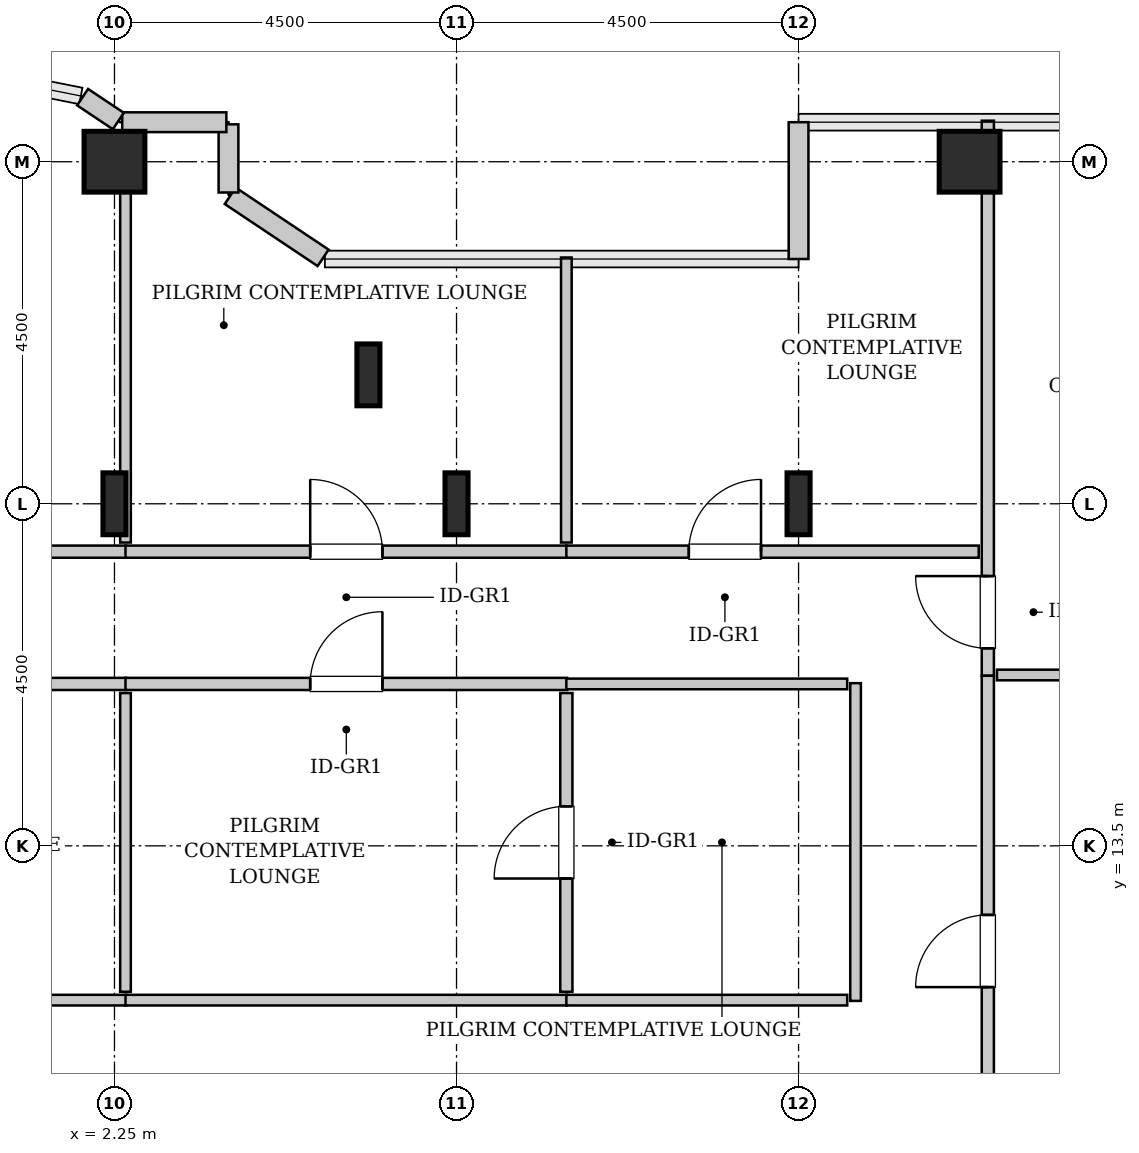
"""IFC4 building model, lengths in metres.
Left out: names, types, materials, properties, quantities, classifications, styles, units other than length and angle.
Written with IfcOpenShell. Run it as: python <this file> out.ifc"""

import sys

from ifc_helpers import new_model, si_unit, direction, frame, frame_2d, origin, origin_2d, place, context, subcontext, project, spatial, rectangle, hollow_rectangle, i_section, extrude, source, transform, mapped, element, fill, save


model = new_model("IFC4")
c1 = context("Model", 3, precision=1e-05, world=origin(), true_north=direction((0.0, 1.0)))
c2 = subcontext(c1, "Body", "Model", "MODEL_VIEW")
j1 = project(units=[si_unit("LENGTHUNIT", "METRE"), si_unit("PLANEANGLEUNIT", "RADIAN")], contexts=[c1])
p1 = place(None, origin())
s1 = spatial("IfcSite", under=j1, at=p1, CompositionType="ELEMENT")
p2 = place(p1, origin())
s2 = spatial("IfcBuilding", under=s1, at=p2, CompositionType="ELEMENT")
p3 = place(p2, frame((0.0, 0.0, 152.6)))
s3 = spatial("IfcBuildingStorey", under=s2, at=p3, CompositionType="ELEMENT", Elevation=152.6)
m1 = source(origin(), c2, "Body", "SweptSolid", [
    extrude(i_section(OverallWidth=0.303, OverallDepth=0.814, WebThickness=0.021, FlangeThickness=0.04, FilletRadius=0.03, at=origin_2d()), origin(), (0.0, 0.0, 1.0), 3.8),
])
p4 = place(p3, frame((2.25, 18.0, 0.0), z_axis=(0.0, 0.0, 1.0), x_axis=(1.0, 0.0, 0.0)))
e1 = element("IfcColumn", 1, at=p4, inside=s3, PredefinedType="COLUMN", context=c2, shape_type="MappedRepresentation", body=[
    mapped(m1, transform((0.0, 0.0, 0.0), x_axis=(1.0, 0.0, 0.0), y_axis=(0.0, 1.0, 0.0), z_axis=(0.0, 0.0, 1.0), scale=1.0)),
])
m2 = source(origin(), c2, "Body", "SweptSolid", [
    extrude(hollow_rectangle(XDim=0.8, YDim=0.8, WallThickness=0.04, InnerFilletRadius=0.04, OuterFilletRadius=0.08, at=origin_2d()), origin(), (0.0, 0.0, 1.0), 3.8),
])
p5 = place(p3, frame((2.25, 22.5, 0.0), z_axis=(0.0, 0.0, 1.0), x_axis=(1.0, 0.0, 0.0)))
e2 = element("IfcColumn", 2, at=p5, inside=s3, PredefinedType="COLUMN", context=c2, shape_type="MappedRepresentation", body=[
    mapped(m2, transform((0.0, 0.0, 0.0), x_axis=(1.0, 0.0, 0.0), y_axis=(0.0, 1.0, 0.0), z_axis=(0.0, 0.0, 1.0), scale=1.0)),
])
for number, where, z_axis, x_axis in (
    (3, (5.591, 19.696, 0.0), (0.0, 0.0, 1.0), (1.0, 0.0, 0.0)),
    (4, (6.75, 18.0, 0.0), (0.0, 0.0, 1.0), (1.0, 0.0, 0.0)),
    (5, (11.25, 18.0, 0.0), (0.0, 0.0, 1.0), (1.0, 0.0, 0.0)),
):
    element("IfcColumn", number, at=place(p3, frame(where, z_axis=z_axis, x_axis=x_axis)), inside=s3, PredefinedType="COLUMN", context=c2, shape_type="MappedRepresentation", body=[
        mapped(m1, transform((0.0, 0.0, 0.0), x_axis=(1.0, 0.0, 0.0), y_axis=(0.0, 1.0, 0.0), z_axis=(0.0, 0.0, 1.0), scale=1.0)),
    ])
p6 = place(p3, frame((13.5, 22.5, 0.0), z_axis=(0.0, 0.0, 1.0), x_axis=(1.0, 0.0, 0.0)))
e6 = element("IfcColumn", 6, at=p6, inside=s3, PredefinedType="COLUMN", context=c2, shape_type="MappedRepresentation", body=[
    mapped(m2, transform((0.0, 0.0, 0.0), x_axis=(1.0, 0.0, 0.0), y_axis=(0.0, 1.0, 0.0), z_axis=(0.0, 0.0, 1.0), scale=1.0)),
])
m3 = source(origin(), c2, "Body", "SweptSolid", [
    extrude(rectangle(XDim=1.8, YDim=0.26, at=frame_2d((0.9, 0.0))), origin(), (0.0, 0.0, 1.0), 3.55),
])
p7 = place(p3, frame((11.25, 23.02, 0.0), z_axis=(0.0, 0.0, 1.0), x_axis=(0.0, -1.0, 0.0)))
e7 = element("IfcWall", 7, at=p7, inside=s3, PredefinedType="SOLIDWALL", context=c2, shape_type="MappedRepresentation", body=[
    mapped(m3, transform((0.0, 0.0, 0.0), x_axis=(1.0, 0.0, 0.0), y_axis=(0.0, 1.0, 0.0), z_axis=(0.0, 0.0, 1.0), scale=1.0)),
])
m4 = source(origin(), c2, "Body", "SweptSolid", [
    extrude(rectangle(XDim=1.469, YDim=0.26, at=frame_2d((0.734, 0.0))), origin(), (0.0, 0.0, 1.0), 3.55),
])
p8 = place(p3, frame((4.995, 21.236, 0.0), z_axis=(0.0, 0.0, 1.0), x_axis=(-0.831461760506, 0.555581983884, 0.0)))
e8 = element("IfcWall", 8, at=p8, inside=s3, PredefinedType="SOLIDWALL", context=c2, shape_type="MappedRepresentation", body=[
    mapped(m4, transform((0.0, 0.0, 0.0), x_axis=(1.0, 0.0, 0.0), y_axis=(0.0, 1.0, 0.0), z_axis=(0.0, 0.0, 1.0), scale=1.0)),
])
m5 = source(origin(), c2, "Body", "SweptSolid", [
    extrude(rectangle(XDim=0.897, YDim=0.26, at=frame_2d((0.448, 0.0))), origin(), (0.0, 0.0, 1.0), 3.55),
])
p9 = place(p3, frame((3.75, 22.095, 0.0), z_axis=(0.0, 0.0, 1.0), x_axis=(0.0, 1.0, 0.0)))
e9 = element("IfcWall", 9, at=p9, inside=s3, PredefinedType="SOLIDWALL", context=c2, shape_type="MappedRepresentation", body=[
    mapped(m5, transform((0.0, 0.0, 0.0), x_axis=(1.0, 0.0, 0.0), y_axis=(0.0, 1.0, 0.0), z_axis=(0.0, 0.0, 1.0), scale=1.0)),
])
m6 = source(origin(), c2, "Body", "SweptSolid", [
    extrude(rectangle(XDim=1.37, YDim=0.26, at=frame_2d((0.685, 0.0))), origin(), (0.0, 0.0, 1.0), 3.55),
])
p10 = place(p3, frame((3.722, 23.02, 0.0), z_axis=(0.0, 0.0, 1.0), x_axis=(-1.0, 0.0, 0.0)))
e10 = element("IfcWall", 10, at=p10, inside=s3, PredefinedType="SOLIDWALL", context=c2, shape_type="MappedRepresentation", body=[
    mapped(m6, transform((0.0, 0.0, 0.0), x_axis=(1.0, 0.0, 0.0), y_axis=(0.0, 1.0, 0.0), z_axis=(0.0, 0.0, 1.0), scale=1.0)),
])
m7 = source(origin(), c2, "Body", "SweptSolid", [
    extrude(rectangle(XDim=0.565, YDim=0.26, at=frame_2d((0.283, 0.0))), origin(), (0.0, 0.0, 1.0), 3.55),
])
p11 = place(p3, frame((2.301, 23.036, 0.0), z_axis=(0.0, 0.0, 1.0), x_axis=(-0.831651492666, 0.555297933317, 0.0)))
e11 = element("IfcWall", 11, at=p11, inside=s3, PredefinedType="SOLIDWALL", context=c2, shape_type="MappedRepresentation", body=[
    mapped(m7, transform((0.0, 0.0, 0.0), x_axis=(1.0, 0.0, 0.0), y_axis=(0.0, 1.0, 0.0), z_axis=(0.0, 0.0, 1.0), scale=1.0)),
])
m8 = source(origin(), c2, "Body", "SweptSolid", [
    extrude(rectangle(XDim=7.302, YDim=0.16, at=frame_2d((3.651, 0.0))), origin(), (0.0, 0.0, 1.0), 3.535),
])
p12 = place(p3, frame((13.74, 15.738, 0.0), z_axis=(0.0, 0.0, 1.0), x_axis=(0.0, 1.0, 0.0)))
e12 = element("IfcWall", 12, at=p12, inside=s3, PredefinedType="PARTITIONING", context=c2, shape_type="MappedRepresentation", body=[
    mapped(m8, transform((0.0, 0.0, 0.0), x_axis=(1.0, 0.0, 0.0), y_axis=(0.0, 1.0, 0.0), z_axis=(0.0, 0.0, 1.0), scale=1.0)),
])
p13 = place(p12, frame((0.361, 0.0, 0.0)))
e13 = element("IfcOpeningElement", 13, at=p13, cuts=e12, PredefinedType="OPENING", context=c2, shape_type="SweptSolid", body=[
    extrude(rectangle(XDim=0.95, YDim=2.1, at=frame_2d((0.475, 1.05))), frame((0.0, 0.09, 0.0), z_axis=(0.0, -1.0, 0.0), x_axis=(1.0, 0.0, 0.0)), (0.0, 0.0, 1.0), 0.18),
])
m9 = source(origin(), c2, "Body", "SweptSolid", [
    extrude(rectangle(XDim=11.43, YDim=0.14, at=frame_2d((5.715, 0.0))), origin(), (0.0, 0.0, 1.0), 3.535),
])
p14 = place(p3, frame((13.86, 15.748, 0.0), z_axis=(0.0, 0.0, 1.0), x_axis=(1.0, 0.0, 0.0)))
e14 = element("IfcWall", 14, at=p14, inside=s3, PredefinedType="PARTITIONING", context=c2, shape_type="MappedRepresentation", body=[
    mapped(m9, transform((0.0, 0.0, 0.0), x_axis=(1.0, 0.0, 0.0), y_axis=(0.0, 1.0, 0.0), z_axis=(0.0, 0.0, 1.0), scale=1.0)),
])
m10 = source(origin(), c2, "Body", "SweptSolid", [
    extrude(rectangle(XDim=7.242, YDim=0.16, at=frame_2d((3.621, 0.0))), origin(), (0.0, 0.0, 1.0), 3.535),
])
p15 = place(p3, frame((13.74, 8.495, 0.0), z_axis=(0.0, 0.0, 1.0), x_axis=(0.0, 1.0, 0.0)))
e15 = element("IfcWall", 15, at=p15, inside=s3, PredefinedType="PARTITIONING", context=c2, shape_type="MappedRepresentation", body=[
    mapped(m10, transform((0.0, 0.0, 0.0), x_axis=(1.0, 0.0, 0.0), y_axis=(0.0, 1.0, 0.0), z_axis=(0.0, 0.0, 1.0), scale=1.0)),
])
p16 = place(p15, frame((3.146, 0.0, 0.0)))
e16 = element("IfcOpeningElement", 16, at=p16, cuts=e15, PredefinedType="OPENING", context=c2, shape_type="SweptSolid", body=[
    extrude(rectangle(XDim=0.95, YDim=2.1, at=frame_2d((0.475, 1.05))), frame((0.0, 0.09, 0.0), z_axis=(0.0, -1.0, 0.0), x_axis=(1.0, 0.0, 0.0)), (0.0, 0.0, 1.0), 0.18),
])
m11 = source(origin(), c2, "Body", "SweptSolid", [
    extrude(rectangle(XDim=7.41, YDim=0.16, at=frame_2d((3.705, 0.0))), origin(), (0.0, 0.0, 1.0), 3.535),
])
p17 = place(p3, frame((-5.005, 17.37, 0.0), z_axis=(0.0, 0.0, 1.0), x_axis=(1.0, 0.0, 0.0)))
e17 = element("IfcWall", 17, at=p17, inside=s3, PredefinedType="PARTITIONING", context=c2, shape_type="MappedRepresentation", body=[
    mapped(m11, transform((0.0, 0.0, 0.0), x_axis=(1.0, 0.0, 0.0), y_axis=(0.0, 1.0, 0.0), z_axis=(0.0, 0.0, 1.0), scale=1.0)),
])
p18 = place(p17, frame((3.23, 0.0, 0.0)))
e18 = element("IfcOpeningElement", 18, at=p18, cuts=e17, PredefinedType="OPENING", context=c2, shape_type="SweptSolid", body=[
    extrude(rectangle(XDim=0.95, YDim=2.1, at=frame_2d((0.475, 1.05))), frame((0.0, 0.09, 0.0), z_axis=(0.0, -1.0, 0.0), x_axis=(1.0, 0.0, 0.0)), (0.0, 0.0, 1.0), 0.18),
])
m12 = source(origin(), c2, "Body", "SweptSolid", [
    extrude(rectangle(XDim=5.36, YDim=0.14, at=frame_2d((2.68, 0.0))), origin(), (0.0, 0.0, 1.0), 2.875),
])
p19 = place(p3, frame((2.395, 17.49, 0.0), z_axis=(0.0, 0.0, 1.0), x_axis=(0.0, 1.0, 0.0)))
e19 = element("IfcWall", 19, at=p19, inside=s3, PredefinedType="PARTITIONING", context=c2, shape_type="MappedRepresentation", body=[
    mapped(m12, transform((0.0, 0.0, 0.0), x_axis=(1.0, 0.0, 0.0), y_axis=(0.0, 1.0, 0.0), z_axis=(0.0, 0.0, 1.0), scale=1.0)),
])
p20 = place(p3, frame((-5.005, 15.63, 0.0), z_axis=(0.0, 0.0, 1.0), x_axis=(1.0, 0.0, 0.0)))
e20 = element("IfcWall", 20, at=p20, inside=s3, PredefinedType="PARTITIONING", context=c2, shape_type="MappedRepresentation", body=[
    mapped(m11, transform((0.0, 0.0, 0.0), x_axis=(1.0, 0.0, 0.0), y_axis=(0.0, 1.0, 0.0), z_axis=(0.0, 0.0, 1.0), scale=1.0)),
])
p21 = place(p20, frame((3.23, 0.0, 0.0)))
e21 = element("IfcOpeningElement", 21, at=p21, cuts=e20, PredefinedType="OPENING", context=c2, shape_type="SweptSolid", body=[
    extrude(rectangle(XDim=0.95, YDim=2.1, at=frame_2d((0.475, 1.05))), frame((0.0, 0.09, 0.0), z_axis=(0.0, -1.0, 0.0), x_axis=(1.0, 0.0, 0.0)), (0.0, 0.0, 1.0), 0.18),
])
m13 = source(origin(), c2, "Body", "SweptSolid", [
    extrude(rectangle(XDim=7.41, YDim=0.14, at=frame_2d((3.705, 0.0))), origin(), (0.0, 0.0, 1.0), 3.535),
])
p22 = place(p3, frame((-5.005, 11.47, 0.0), z_axis=(0.0, 0.0, 1.0), x_axis=(1.0, 0.0, 0.0)))
e22 = element("IfcWall", 22, at=p22, inside=s3, PredefinedType="PARTITIONING", context=c2, shape_type="MappedRepresentation", body=[
    mapped(m13, transform((0.0, 0.0, 0.0), x_axis=(1.0, 0.0, 0.0), y_axis=(0.0, 1.0, 0.0), z_axis=(0.0, 0.0, 1.0), scale=1.0)),
])
m14 = source(origin(), c2, "Body", "SweptSolid", [
    extrude(rectangle(XDim=3.93, YDim=0.14, at=frame_2d((1.965, 0.0))), origin(), (0.0, 0.0, 1.0), 3.535),
])
p23 = place(p3, frame((2.395, 11.58, 0.0), z_axis=(0.0, 0.0, 1.0), x_axis=(0.0, 1.0, 0.0)))
e23 = element("IfcWall", 23, at=p23, inside=s3, PredefinedType="PARTITIONING", context=c2, shape_type="MappedRepresentation", body=[
    mapped(m14, transform((0.0, 0.0, 0.0), x_axis=(1.0, 0.0, 0.0), y_axis=(0.0, 1.0, 0.0), z_axis=(0.0, 0.0, 1.0), scale=1.0)),
])
m15 = source(origin(), c2, "Body", "SweptSolid", [
    extrude(rectangle(XDim=5.81, YDim=0.16, at=frame_2d((2.905, 0.0))), origin(), (0.0, 0.0, 1.0), 3.535),
])
p24 = place(p3, frame((2.395, 17.37, 0.0), z_axis=(0.0, 0.0, 1.0), x_axis=(1.0, 0.0, 0.0)))
e24 = element("IfcWall", 24, at=p24, inside=s3, PredefinedType="PARTITIONING", context=c2, shape_type="MappedRepresentation", body=[
    mapped(m15, transform((0.0, 0.0, 0.0), x_axis=(1.0, 0.0, 0.0), y_axis=(0.0, 1.0, 0.0), z_axis=(0.0, 0.0, 1.0), scale=1.0)),
])
p25 = place(p24, frame((2.43, 0.0, 0.0)))
e25 = element("IfcOpeningElement", 25, at=p25, cuts=e24, PredefinedType="OPENING", context=c2, shape_type="SweptSolid", body=[
    extrude(rectangle(XDim=0.95, YDim=2.1, at=frame_2d((0.475, 1.05))), frame((0.0, 0.09, 0.0), z_axis=(0.0, -1.0, 0.0), x_axis=(1.0, 0.0, 0.0)), (0.0, 0.0, 1.0), 0.18),
])
m16 = source(origin(), c2, "Body", "SweptSolid", [
    extrude(rectangle(XDim=3.75, YDim=0.14, at=frame_2d((1.875, 0.0))), origin(), (0.0, 0.0, 1.0), 3.535),
])
p26 = place(p3, frame((8.195, 17.49, 0.0), z_axis=(0.0, 0.0, 1.0), x_axis=(0.0, 1.0, 0.0)))
e26 = element("IfcWall", 26, at=p26, inside=s3, PredefinedType="PARTITIONING", context=c2, shape_type="MappedRepresentation", body=[
    mapped(m16, transform((0.0, 0.0, 0.0), x_axis=(1.0, 0.0, 0.0), y_axis=(0.0, 1.0, 0.0), z_axis=(0.0, 0.0, 1.0), scale=1.0)),
])
p27 = place(p3, frame((2.395, 15.63, 0.0), z_axis=(0.0, 0.0, 1.0), x_axis=(1.0, 0.0, 0.0)))
e27 = element("IfcWall", 27, at=p27, inside=s3, PredefinedType="PARTITIONING", context=c2, shape_type="MappedRepresentation", body=[
    mapped(m15, transform((0.0, 0.0, 0.0), x_axis=(1.0, 0.0, 0.0), y_axis=(0.0, 1.0, 0.0), z_axis=(0.0, 0.0, 1.0), scale=1.0)),
])
p28 = place(p27, frame((2.43, 0.0, 0.0)))
e28 = element("IfcOpeningElement", 28, at=p28, cuts=e27, PredefinedType="OPENING", context=c2, shape_type="SweptSolid", body=[
    extrude(rectangle(XDim=0.95, YDim=2.1, at=frame_2d((0.475, 1.05))), frame((0.0, 0.09, 0.0), z_axis=(0.0, -1.0, 0.0), x_axis=(1.0, 0.0, 0.0)), (0.0, 0.0, 1.0), 0.18),
])
m17 = source(origin(), c2, "Body", "SweptSolid", [
    extrude(rectangle(XDim=5.81, YDim=0.14, at=frame_2d((2.905, 0.0))), origin(), (0.0, 0.0, 1.0), 3.535),
])
p29 = place(p3, frame((2.395, 11.47, 0.0), z_axis=(0.0, 0.0, 1.0), x_axis=(1.0, 0.0, 0.0)))
e29 = element("IfcWall", 29, at=p29, inside=s3, PredefinedType="PARTITIONING", context=c2, shape_type="MappedRepresentation", body=[
    mapped(m17, transform((0.0, 0.0, 0.0), x_axis=(1.0, 0.0, 0.0), y_axis=(0.0, 1.0, 0.0), z_axis=(0.0, 0.0, 1.0), scale=1.0)),
])
m18 = source(origin(), c2, "Body", "SweptSolid", [
    extrude(rectangle(XDim=3.93, YDim=0.16, at=frame_2d((1.965, 0.0))), origin(), (0.0, 0.0, 1.0), 3.535),
])
p30 = place(p3, frame((8.195, 11.58, 0.0), z_axis=(0.0, 0.0, 1.0), x_axis=(0.0, 1.0, 0.0)))
e30 = element("IfcWall", 30, at=p30, inside=s3, PredefinedType="PARTITIONING", context=c2, shape_type="MappedRepresentation", body=[
    mapped(m18, transform((0.0, 0.0, 0.0), x_axis=(1.0, 0.0, 0.0), y_axis=(0.0, 1.0, 0.0), z_axis=(0.0, 0.0, 1.0), scale=1.0)),
])
p31 = place(p30, frame((1.49, 0.0, 0.0)))
e31 = element("IfcOpeningElement", 31, at=p31, cuts=e30, PredefinedType="OPENING", context=c2, shape_type="SweptSolid", body=[
    extrude(rectangle(XDim=0.95, YDim=2.1, at=frame_2d((0.475, 1.05))), frame((0.0, 0.09, 0.0), z_axis=(0.0, -1.0, 0.0), x_axis=(1.0, 0.0, 0.0)), (0.0, 0.0, 1.0), 0.18),
])
m19 = source(origin(), c2, "Body", "SweptSolid", [
    extrude(rectangle(XDim=5.425, YDim=0.16, at=frame_2d((2.712, 0.0))), origin(), (0.0, 0.0, 1.0), 3.535),
])
p32 = place(p3, frame((8.195, 17.37, 0.0), z_axis=(0.0, 0.0, 1.0), x_axis=(1.0, 0.0, 0.0)))
e32 = element("IfcWall", 32, at=p32, inside=s3, PredefinedType="PARTITIONING", context=c2, shape_type="MappedRepresentation", body=[
    mapped(m19, transform((0.0, 0.0, 0.0), x_axis=(1.0, 0.0, 0.0), y_axis=(0.0, 1.0, 0.0), z_axis=(0.0, 0.0, 1.0), scale=1.0)),
])
p33 = place(p32, frame((1.611, 0.0, 0.0)))
e33 = element("IfcOpeningElement", 33, at=p33, cuts=e32, PredefinedType="OPENING", context=c2, shape_type="SweptSolid", body=[
    extrude(rectangle(XDim=0.95, YDim=2.1, at=frame_2d((0.475, 1.05))), frame((0.0, 0.09, 0.0), z_axis=(0.0, -1.0, 0.0), x_axis=(1.0, 0.0, 0.0)), (0.0, 0.0, 1.0), 0.18),
])
m20 = source(origin(), c2, "Body", "SweptSolid", [
    extrude(rectangle(XDim=4.18, YDim=0.14, at=frame_2d((2.09, 0.0))), origin(), (0.0, 0.0, 1.0), 3.535),
])
p34 = place(p3, frame((12.0, 11.46, 0.0), z_axis=(0.0, 0.0, 1.0), x_axis=(0.0, 1.0, 0.0)))
e34 = element("IfcWall", 34, at=p34, inside=s3, PredefinedType="PARTITIONING", context=c2, shape_type="MappedRepresentation", body=[
    mapped(m20, transform((0.0, 0.0, 0.0), x_axis=(1.0, 0.0, 0.0), y_axis=(0.0, 1.0, 0.0), z_axis=(0.0, 0.0, 1.0), scale=1.0)),
])
m21 = source(origin(), c2, "Body", "SweptSolid", [
    extrude(rectangle(XDim=3.695, YDim=0.14, at=frame_2d((1.847, 0.0))), origin(), (0.0, 0.0, 1.0), 3.535),
])
for number, where, z_axis, x_axis in (
    (35, (8.195, 15.63, 0.0), (0.0, 0.0, 1.0), (1.0, 0.0, 0.0)),
    (36, (8.195, 11.47, 0.0), (0.0, 0.0, 1.0), (1.0, 0.0, 0.0)),
):
    element("IfcWall", number, at=place(p3, frame(where, z_axis=z_axis, x_axis=x_axis)), inside=s3, PredefinedType="PARTITIONING", context=c2, shape_type="MappedRepresentation", body=[
        mapped(m21, transform((0.0, 0.0, 0.0), x_axis=(1.0, 0.0, 0.0), y_axis=(0.0, 1.0, 0.0), z_axis=(0.0, 0.0, 1.0), scale=1.0)),
    ])
m22 = source(origin(), c2, "Body", "SweptSolid", [
    extrude(rectangle(XDim=0.95, YDim=2.1, at=frame_2d((0.475, 1.05))), frame((0.0, 0.025, 0.0), z_axis=(0.0, -1.0, 0.0), x_axis=(1.0, 0.0, 0.0)), (0.0, 0.0, 1.0), 0.05),
])
p35 = place(p13, origin())
e37 = element("IfcDoor", 37, at=p35, inside=s3, OperationType="SINGLE_SWING_RIGHT", PredefinedType="DOOR", context=c2, shape_type="MappedRepresentation", body=[
    mapped(m22, transform((0.0, 0.0, 0.0), x_axis=(1.0, 0.0, 0.0), y_axis=(0.0, 1.0, 0.0), z_axis=(0.0, 0.0, 1.0), scale=1.0)),
])
fill(e13, e37)
p36 = place(p16, origin())
e38 = element("IfcDoor", 38, at=p36, inside=s3, OperationType="SINGLE_SWING_LEFT", PredefinedType="DOOR", context=c2, shape_type="MappedRepresentation", body=[
    mapped(m22, transform((0.0, 0.0, 0.0), x_axis=(1.0, 0.0, 0.0), y_axis=(0.0, 1.0, 0.0), z_axis=(0.0, 0.0, 1.0), scale=1.0)),
])
fill(e16, e38)
p37 = place(p25, origin())
e39 = element("IfcDoor", 39, at=p37, inside=s3, OperationType="SINGLE_SWING_LEFT", PredefinedType="DOOR", context=c2, shape_type="MappedRepresentation", body=[
    mapped(m22, transform((0.0, 0.0, 0.0), x_axis=(1.0, 0.0, 0.0), y_axis=(0.0, 1.0, 0.0), z_axis=(0.0, 0.0, 1.0), scale=1.0)),
])
fill(e25, e39)
p38 = place(p28, origin())
e40 = element("IfcDoor", 40, at=p38, inside=s3, OperationType="SINGLE_SWING_RIGHT", PredefinedType="DOOR", context=c2, shape_type="MappedRepresentation", body=[
    mapped(m22, transform((0.0, 0.0, 0.0), x_axis=(1.0, 0.0, 0.0), y_axis=(0.0, 1.0, 0.0), z_axis=(0.0, 0.0, 1.0), scale=1.0)),
])
fill(e28, e40)
p39 = place(p31, origin())
e41 = element("IfcDoor", 41, at=p39, inside=s3, OperationType="SINGLE_SWING_LEFT", PredefinedType="DOOR", context=c2, shape_type="MappedRepresentation", body=[
    mapped(m22, transform((0.0, 0.0, 0.0), x_axis=(1.0, 0.0, 0.0), y_axis=(0.0, 1.0, 0.0), z_axis=(0.0, 0.0, 1.0), scale=1.0)),
])
fill(e31, e41)
p40 = place(p33, origin())
e42 = element("IfcDoor", 42, at=p40, inside=s3, OperationType="SINGLE_SWING_RIGHT", PredefinedType="DOOR", context=c2, shape_type="MappedRepresentation", body=[
    mapped(m22, transform((0.0, 0.0, 0.0), x_axis=(1.0, 0.0, 0.0), y_axis=(0.0, 1.0, 0.0), z_axis=(0.0, 0.0, 1.0), scale=1.0)),
])
fill(e33, e42)
save(model, sys.argv[1])
